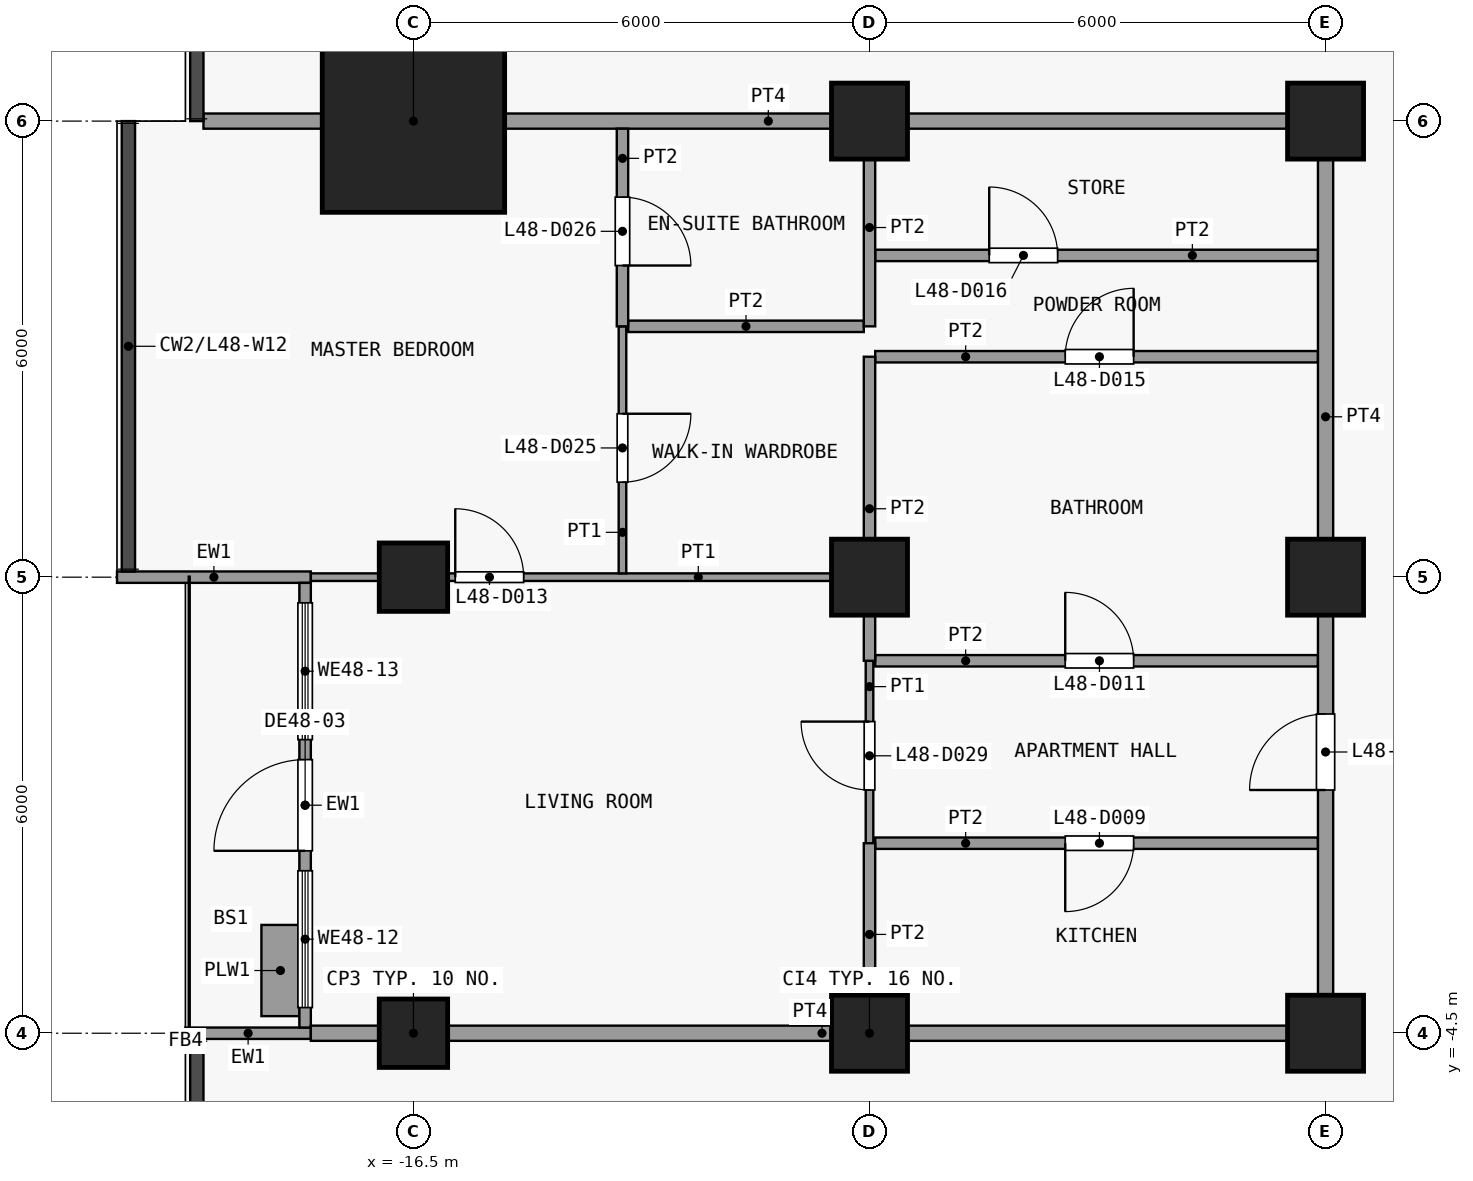
"""IFC4 building model, lengths in metres.
Left out: names, types, materials, properties, quantities, classifications, styles, units other than length and angle.
Written with IfcOpenShell. Run it as: python <this file> out.ifc"""

import sys

from ifc_helpers import new_model, si_unit, direction, frame, frame_2d, origin, origin_2d, place, context, subcontext, project, spatial, rectangle, extrude, element, fill, save


model = new_model("IFC4")
c1 = context("Model", 3, precision=1e-05, world=origin(), true_north=direction((0.0, 1.0)))
c2 = subcontext(c1, "Body", "Model", "MODEL_VIEW")
j1 = project(units=[si_unit("LENGTHUNIT", "METRE"), si_unit("PLANEANGLEUNIT", "RADIAN")], contexts=[c1])
p1 = place(None, origin())
s1 = spatial("IfcSite", under=j1, at=p1, CompositionType="ELEMENT")
p2 = place(p1, origin())
s2 = spatial("IfcBuilding", under=s1, at=p2, CompositionType="ELEMENT")
p3 = place(p2, frame((0.0, 0.0, 192.5)))
s3 = spatial("IfcBuildingStorey", under=s2, at=p3, CompositionType="ELEMENT", Elevation=192.5)
for number, where, z_axis, x_axis in (
    (1, (-16.5, -4.5, 0.0), (0.0, 0.0, 1.0), (1.0, 0.0, 0.0)),
    (2, (-16.5, 1.5, 0.0), (0.0, 0.0, 1.0), (1.0, 0.0, 0.0)),
):
    element("IfcColumn", number, at=place(p3, frame(where, z_axis=z_axis, x_axis=x_axis)), inside=s3, PredefinedType="COLUMN", context=c2, shape_type="SweptSolid", body=[
        extrude(rectangle(XDim=0.9, YDim=0.9, at=origin_2d()), origin(), (0.0, 0.0, 1.0), 3.6),
    ])
p4 = place(p3, frame((-16.5, 7.5, 0.0), z_axis=(0.0, 0.0, 1.0), x_axis=(1.0, 0.0, 0.0)))
e3 = element("IfcColumn", 3, at=p4, inside=s3, PredefinedType="COLUMN", context=c2, shape_type="SweptSolid", body=[
    extrude(rectangle(XDim=2.4, YDim=2.4, at=origin_2d()), origin(), (0.0, 0.0, 1.0), 3.6),
])
for number, where, z_axis, x_axis in (
    (4, (-10.5, -4.5, 0.0), (0.0, 0.0, 1.0), (1.0, 0.0, 0.0)),
    (5, (-10.5, 1.5, 0.0), (0.0, 0.0, 1.0), (1.0, 0.0, 0.0)),
    (6, (-10.5, 7.5, 0.0), (0.0, 0.0, 1.0), (1.0, 0.0, 0.0)),
    (7, (-4.5, -4.5, 0.0), (0.0, 0.0, 1.0), (1.0, 0.0, 0.0)),
    (8, (-4.5, 1.5, 0.0), (0.0, 0.0, 1.0), (1.0, 0.0, 0.0)),
    (9, (-4.5, 7.5, 0.0), (0.0, 0.0, 1.0), (1.0, 0.0, 0.0)),
):
    element("IfcColumn", number, at=place(p3, frame(where, z_axis=z_axis, x_axis=x_axis)), inside=s3, PredefinedType="COLUMN", context=c2, shape_type="SweptSolid", body=[
        extrude(rectangle(XDim=1.0, YDim=1.0, at=origin_2d()), origin(), (0.0, 0.0, 1.0), 3.6),
    ])
p5 = place(p3, frame((-17.85, -4.5, 0.0), z_axis=(0.0, 0.0, 1.0), x_axis=(-1.0, 0.0, 0.0)))
e10 = element("IfcWall", 10, at=p5, inside=s3, PredefinedType="SOLIDWALL", context=c2, shape_type="SweptSolid", body=[
    extrude(rectangle(XDim=1.65, YDim=0.15, at=frame_2d((0.825, 0.0))), origin(), (0.0, 0.0, 1.0), 3.3),
])
p6 = place(p3, frame((-17.85, 1.5, 0.0), z_axis=(0.0, 0.0, 1.0), x_axis=(-1.0, 0.0, 0.0)))
e11 = element("IfcWall", 11, at=p6, inside=s3, PredefinedType="SOLIDWALL", context=c2, shape_type="SweptSolid", body=[
    extrude(rectangle(XDim=2.55, YDim=0.15, at=frame_2d((1.275, 0.0))), origin(), (0.0, 0.0, 1.0), 3.3),
])
p7 = place(p3, frame((-17.925, -4.425, 0.0), z_axis=(0.0, 0.0, 1.0), x_axis=(0.0, 1.0, 0.0)))
e12 = element("IfcWall", 12, at=p7, inside=s3, PredefinedType="SOLIDWALL", context=c2, shape_type="SweptSolid", body=[
    extrude(rectangle(XDim=5.85, YDim=0.15, at=frame_2d((2.925, 0.0))), origin(), (0.0, 0.0, 1.0), 3.3),
])
p8 = place(p7, frame((2.325, 0.0, 0.0)))
e13 = element("IfcOpeningElement", 13, at=p8, cuts=e12, PredefinedType="OPENING", context=c2, shape_type="SweptSolid", body=[
    extrude(rectangle(XDim=1.2, YDim=2.4, at=frame_2d((0.6, 1.2))), frame((0.0, 0.085, 0.0), z_axis=(0.0, -1.0, 0.0), x_axis=(1.0, 0.0, 0.0)), (0.0, 0.0, 1.0), 0.17),
])
p9 = place(p7, frame((0.262, 0.0, 0.9)))
e14 = element("IfcOpeningElement", 14, at=p9, cuts=e12, PredefinedType="OPENING", context=c2, shape_type="SweptSolid", body=[
    extrude(rectangle(XDim=1.8, YDim=2.1, at=frame_2d((0.9, 1.05))), frame((0.0, 0.085, 0.0), z_axis=(0.0, -1.0, 0.0), x_axis=(1.0, 0.0, 0.0)), (0.0, 0.0, 1.0), 0.17),
])
p10 = place(p7, frame((3.788, 0.0, 0.9)))
e15 = element("IfcOpeningElement", 15, at=p10, cuts=e12, PredefinedType="OPENING", context=c2, shape_type="SweptSolid", body=[
    extrude(rectangle(XDim=1.8, YDim=2.1, at=frame_2d((0.9, 1.05))), frame((0.0, 0.085, 0.0), z_axis=(0.0, -1.0, 0.0), x_axis=(1.0, 0.0, 0.0)), (0.0, 0.0, 1.0), 0.17),
])
p11 = place(p3, frame((-18.25, -4.275, 0.0), z_axis=(0.0, 0.0, 1.0), x_axis=(0.0, 1.0, 0.0)))
e16 = element("IfcWall", 16, at=p11, inside=s3, PredefinedType="USERDEFINED", context=c2, shape_type="SweptSolid", body=[
    extrude(rectangle(XDim=1.2, YDim=0.5, at=frame_2d((0.6, 0.0))), origin(), (0.0, 0.0, 1.0), 0.9),
])
p12 = place(p3, frame((-17.85, -4.5, 0.0), z_axis=(0.0, 0.0, 1.0), x_axis=(1.0, 0.0, 0.0)))
e17 = element("IfcWall", 17, at=p12, inside=s3, PredefinedType="PARTITIONING", context=c2, shape_type="SweptSolid", body=[
    extrude(rectangle(XDim=13.45, YDim=0.2, at=frame_2d((6.725, 0.0))), origin(), (0.0, 0.0, 1.0), 3.3),
])
p13 = place(p3, frame((-10.425, -2.0, 0.0), z_axis=(0.0, 0.0, 1.0), x_axis=(1.0, 0.0, 0.0)))
e18 = element("IfcWall", 18, at=p13, inside=s3, PredefinedType="PARTITIONING", context=c2, shape_type="SweptSolid", body=[
    extrude(rectangle(XDim=5.825, YDim=0.15, at=frame_2d((2.913, 0.0))), origin(), (0.0, 0.0, 1.0), 3.3),
])
p14 = place(p13, frame((2.5, 0.0, 0.0)))
e19 = element("IfcOpeningElement", 19, at=p14, cuts=e18, PredefinedType="OPENING", context=c2, shape_type="SweptSolid", body=[
    extrude(rectangle(XDim=0.9, YDim=2.1, at=frame_2d((0.45, 1.05))), frame((0.0, 0.085, 0.0), z_axis=(0.0, -1.0, 0.0), x_axis=(1.0, 0.0, 0.0)), (0.0, 0.0, 1.0), 0.17),
])
p15 = place(p3, frame((-10.425, 0.4, 0.0), z_axis=(0.0, 0.0, 1.0), x_axis=(1.0, 0.0, 0.0)))
e20 = element("IfcWall", 20, at=p15, inside=s3, PredefinedType="PARTITIONING", context=c2, shape_type="SweptSolid", body=[
    extrude(rectangle(XDim=5.825, YDim=0.15, at=frame_2d((2.913, 0.0))), origin(), (0.0, 0.0, 1.0), 3.3),
])
p16 = place(p15, frame((2.5, 0.0, 0.0)))
e21 = element("IfcOpeningElement", 21, at=p16, cuts=e20, PredefinedType="OPENING", context=c2, shape_type="SweptSolid", body=[
    extrude(rectangle(XDim=0.9, YDim=2.1, at=frame_2d((0.45, 1.05))), frame((0.0, 0.085, 0.0), z_axis=(0.0, -1.0, 0.0), x_axis=(1.0, 0.0, 0.0)), (0.0, 0.0, 1.0), 0.17),
])
p17 = place(p3, frame((-17.85, 1.5, 0.0), z_axis=(0.0, 0.0, 1.0), x_axis=(1.0, 0.0, 0.0)))
e22 = element("IfcWall", 22, at=p17, inside=s3, PredefinedType="PARTITIONING", context=c2, shape_type="SweptSolid", body=[
    extrude(rectangle(XDim=7.275, YDim=0.1, at=frame_2d((3.638, 0.0))), origin(), (0.0, 0.0, 1.0), 3.3),
])
p18 = place(p17, frame((1.9, 0.0, 0.0)))
e23 = element("IfcOpeningElement", 23, at=p18, cuts=e22, PredefinedType="OPENING", context=c2, shape_type="SweptSolid", body=[
    extrude(rectangle(XDim=0.9, YDim=2.1, at=frame_2d((0.45, 1.05))), frame((0.0, 0.06, 0.0), z_axis=(0.0, -1.0, 0.0), x_axis=(1.0, 0.0, 0.0)), (0.0, 0.0, 1.0), 0.12),
])
p19 = place(p3, frame((-10.425, 4.4, 0.0), z_axis=(0.0, 0.0, 1.0), x_axis=(1.0, 0.0, 0.0)))
e24 = element("IfcWall", 24, at=p19, inside=s3, PredefinedType="PARTITIONING", context=c2, shape_type="SweptSolid", body=[
    extrude(rectangle(XDim=5.825, YDim=0.15, at=frame_2d((2.913, 0.0))), origin(), (0.0, 0.0, 1.0), 3.3),
])
p20 = place(p19, frame((2.5, 0.0, 0.0)))
e25 = element("IfcOpeningElement", 25, at=p20, cuts=e24, PredefinedType="OPENING", context=c2, shape_type="SweptSolid", body=[
    extrude(rectangle(XDim=0.9, YDim=2.1, at=frame_2d((0.45, 1.05))), frame((0.0, 0.085, 0.0), z_axis=(0.0, -1.0, 0.0), x_axis=(1.0, 0.0, 0.0)), (0.0, 0.0, 1.0), 0.17),
])
p21 = place(p3, frame((-13.675, 4.8, 0.0), z_axis=(0.0, 0.0, 1.0), x_axis=(1.0, 0.0, 0.0)))
e26 = element("IfcWall", 26, at=p21, inside=s3, PredefinedType="PARTITIONING", context=c2, shape_type="SweptSolid", body=[
    extrude(rectangle(XDim=3.1, YDim=0.15, at=frame_2d((1.55, 0.0))), origin(), (0.0, 0.0, 1.0), 3.3),
])
p22 = place(p3, frame((-10.425, 5.733, 0.0), z_axis=(0.0, 0.0, 1.0), x_axis=(1.0, 0.0, 0.0)))
e27 = element("IfcWall", 27, at=p22, inside=s3, PredefinedType="PARTITIONING", context=c2, shape_type="SweptSolid", body=[
    extrude(rectangle(XDim=5.825, YDim=0.15, at=frame_2d((2.913, 0.0))), origin(), (0.0, 0.0, 1.0), 3.3),
])
p23 = place(p22, frame((1.5, 0.0, 0.0)))
e28 = element("IfcOpeningElement", 28, at=p23, cuts=e27, PredefinedType="OPENING", context=c2, shape_type="SweptSolid", body=[
    extrude(rectangle(XDim=0.9, YDim=2.1, at=frame_2d((0.45, 1.05))), frame((0.0, 0.085, 0.0), z_axis=(0.0, -1.0, 0.0), x_axis=(1.0, 0.0, 0.0)), (0.0, 0.0, 1.0), 0.17),
])
p24 = place(p3, frame((-19.262, 7.5, 0.0), z_axis=(0.0, 0.0, 1.0), x_axis=(1.0, 0.0, 0.0)))
e29 = element("IfcWall", 29, at=p24, inside=s3, PredefinedType="PARTITIONING", context=c2, shape_type="SweptSolid", body=[
    extrude(rectangle(XDim=14.863, YDim=0.2, at=frame_2d((7.431, 0.0))), origin(), (0.0, 0.0, 1.0), 3.3),
])
p25 = place(p3, frame((-13.75, 1.55, 0.0), z_axis=(0.0, 0.0, 1.0), x_axis=(0.0, 1.0, 0.0)))
e30 = element("IfcWall", 30, at=p25, inside=s3, PredefinedType="PARTITIONING", context=c2, shape_type="SweptSolid", body=[
    extrude(rectangle(XDim=3.25, YDim=0.1, at=frame_2d((1.625, 0.0))), origin(), (0.0, 0.0, 1.0), 3.3),
])
p26 = place(p25, frame((1.2, 0.0, 0.0)))
e31 = element("IfcOpeningElement", 31, at=p26, cuts=e30, PredefinedType="OPENING", context=c2, shape_type="SweptSolid", body=[
    extrude(rectangle(XDim=0.9, YDim=2.1, at=frame_2d((0.45, 1.05))), frame((0.0, 0.06, 0.0), z_axis=(0.0, -1.0, 0.0), x_axis=(1.0, 0.0, 0.0)), (0.0, 0.0, 1.0), 0.12),
])
p27 = place(p3, frame((-13.75, 4.8, 0.0), z_axis=(0.0, 0.0, 1.0), x_axis=(0.0, 1.0, 0.0)))
e32 = element("IfcWall", 32, at=p27, inside=s3, PredefinedType="PARTITIONING", context=c2, shape_type="SweptSolid", body=[
    extrude(rectangle(XDim=2.6, YDim=0.15, at=frame_2d((1.3, 0.0))), origin(), (0.0, 0.0, 1.0), 3.3),
])
p28 = place(p27, frame((0.8, 0.0, 0.0)))
e33 = element("IfcOpeningElement", 33, at=p28, cuts=e32, PredefinedType="OPENING", context=c2, shape_type="SweptSolid", body=[
    extrude(rectangle(XDim=0.9, YDim=2.1, at=frame_2d((0.45, 1.05))), frame((0.0, 0.085, 0.0), z_axis=(0.0, -1.0, 0.0), x_axis=(1.0, 0.0, 0.0)), (0.0, 0.0, 1.0), 0.17),
])
p29 = place(p3, frame((-10.5, -2.0, 0.0), z_axis=(0.0, 0.0, 1.0), x_axis=(0.0, 1.0, 0.0)))
e34 = element("IfcWall", 34, at=p29, inside=s3, PredefinedType="PARTITIONING", context=c2, shape_type="SweptSolid", body=[
    extrude(rectangle(XDim=2.4, YDim=0.1, at=frame_2d((1.2, 0.0))), origin(), (0.0, 0.0, 1.0), 3.3),
])
p30 = place(p29, frame((0.7, 0.0, 0.0)))
e35 = element("IfcOpeningElement", 35, at=p30, cuts=e34, PredefinedType="OPENING", context=c2, shape_type="SweptSolid", body=[
    extrude(rectangle(XDim=0.9, YDim=2.1, at=frame_2d((0.45, 1.05))), frame((0.0, 0.06, 0.0), z_axis=(0.0, -1.0, 0.0), x_axis=(1.0, 0.0, 0.0)), (0.0, 0.0, 1.0), 0.12),
])
p31 = place(p3, frame((-10.5, -4.4, 0.0), z_axis=(0.0, 0.0, 1.0), x_axis=(0.0, 1.0, 0.0)))
e36 = element("IfcWall", 36, at=p31, inside=s3, PredefinedType="PARTITIONING", context=c2, shape_type="SweptSolid", body=[
    extrude(rectangle(XDim=2.4, YDim=0.15, at=frame_2d((1.2, 0.0))), origin(), (0.0, 0.0, 1.0), 3.3),
])
p32 = place(p3, frame((-10.5, 0.4, 0.0), z_axis=(0.0, 0.0, 1.0), x_axis=(0.0, 1.0, 0.0)))
e37 = element("IfcWall", 37, at=p32, inside=s3, PredefinedType="PARTITIONING", context=c2, shape_type="SweptSolid", body=[
    extrude(rectangle(XDim=4.0, YDim=0.15, at=frame_2d((2.0, 0.0))), origin(), (0.0, 0.0, 1.0), 3.3),
])
p33 = place(p3, frame((-10.5, 4.8, 0.0), z_axis=(0.0, 0.0, 1.0), x_axis=(0.0, 1.0, 0.0)))
e38 = element("IfcWall", 38, at=p33, inside=s3, PredefinedType="PARTITIONING", context=c2, shape_type="SweptSolid", body=[
    extrude(rectangle(XDim=2.6, YDim=0.15, at=frame_2d((1.3, 0.0))), origin(), (0.0, 0.0, 1.0), 3.3),
])
p34 = place(p3, frame((-4.5, -4.4, 0.0), z_axis=(0.0, 0.0, 1.0), x_axis=(0.0, 1.0, 0.0)))
e39 = element("IfcWall", 39, at=p34, inside=s3, PredefinedType="PARTITIONING", context=c2, shape_type="SweptSolid", body=[
    extrude(rectangle(XDim=11.8, YDim=0.2, at=frame_2d((5.9, 0.0))), origin(), (0.0, 0.0, 1.0), 3.3),
])
p35 = place(p34, frame((3.1, 0.0, 0.0)))
e40 = element("IfcOpeningElement", 40, at=p35, cuts=e39, PredefinedType="OPENING", context=c2, shape_type="SweptSolid", body=[
    extrude(rectangle(XDim=1.0, YDim=2.1, at=frame_2d((0.5, 1.05))), frame((0.0, 0.11, 0.0), z_axis=(0.0, -1.0, 0.0), x_axis=(1.0, 0.0, 0.0)), (0.0, 0.0, 1.0), 0.22),
])
p36 = place(p8, origin())
e41 = element("IfcDoor", 41, at=p36, inside=s3, OperationType="SINGLE_SWING_LEFT", PredefinedType="DOOR", context=c2, shape_type="SweptSolid", body=[
    extrude(rectangle(XDim=1.2, YDim=2.4, at=frame_2d((0.6, 1.2))), frame((0.0, 0.025, 0.0), z_axis=(0.0, -1.0, 0.0), x_axis=(1.0, 0.0, 0.0)), (0.0, 0.0, 1.0), 0.05),
])
fill(e13, e41)
p37 = place(p9, origin())
e42 = element("IfcWindow", 42, at=p37, inside=s3, PartitioningType="SINGLE_PANEL", PredefinedType="WINDOW", context=c2, shape_type="SweptSolid", body=[
    extrude(rectangle(XDim=1.8, YDim=2.1, at=frame_2d((0.9, 1.05))), frame((0.0, 0.03, 0.0), z_axis=(0.0, -1.0, 0.0), x_axis=(1.0, 0.0, 0.0)), (0.0, 0.0, 1.0), 0.06),
])
fill(e14, e42)
p38 = place(p10, origin())
e43 = element("IfcWindow", 43, at=p38, inside=s3, PartitioningType="SINGLE_PANEL", PredefinedType="WINDOW", context=c2, shape_type="SweptSolid", body=[
    extrude(rectangle(XDim=1.8, YDim=2.1, at=frame_2d((0.9, 1.05))), frame((0.0, 0.03, 0.0), z_axis=(0.0, -1.0, 0.0), x_axis=(1.0, 0.0, 0.0)), (0.0, 0.0, 1.0), 0.06),
])
fill(e15, e43)
p39 = place(p14, origin())
e44 = element("IfcDoor", 44, at=p39, inside=s3, OperationType="SINGLE_SWING_LEFT", PredefinedType="DOOR", context=c2, shape_type="SweptSolid", body=[
    extrude(rectangle(XDim=0.9, YDim=2.1, at=frame_2d((0.45, 1.05))), frame((0.0, 0.025, 0.0), z_axis=(0.0, -1.0, 0.0), x_axis=(1.0, 0.0, 0.0)), (0.0, 0.0, 1.0), 0.05),
])
fill(e19, e44)
p40 = place(p16, origin())
e45 = element("IfcDoor", 45, at=p40, inside=s3, OperationType="SINGLE_SWING_RIGHT", PredefinedType="DOOR", context=c2, shape_type="SweptSolid", body=[
    extrude(rectangle(XDim=0.9, YDim=2.1, at=frame_2d((0.45, 1.05))), frame((0.0, 0.025, 0.0), z_axis=(0.0, -1.0, 0.0), x_axis=(1.0, 0.0, 0.0)), (0.0, 0.0, 1.0), 0.05),
])
fill(e21, e45)
p41 = place(p18, origin())
e46 = element("IfcDoor", 46, at=p41, inside=s3, OperationType="SINGLE_SWING_RIGHT", PredefinedType="DOOR", context=c2, shape_type="SweptSolid", body=[
    extrude(rectangle(XDim=0.9, YDim=2.1, at=frame_2d((0.45, 1.05))), frame((0.0, 0.025, 0.0), z_axis=(0.0, -1.0, 0.0), x_axis=(1.0, 0.0, 0.0)), (0.0, 0.0, 1.0), 0.05),
])
fill(e23, e46)
p42 = place(p20, origin())
e47 = element("IfcDoor", 47, at=p42, inside=s3, OperationType="SINGLE_SWING_LEFT", PredefinedType="DOOR", context=c2, shape_type="SweptSolid", body=[
    extrude(rectangle(XDim=0.9, YDim=2.1, at=frame_2d((0.45, 1.05))), frame((0.0, 0.025, 0.0), z_axis=(0.0, -1.0, 0.0), x_axis=(1.0, 0.0, 0.0)), (0.0, 0.0, 1.0), 0.05),
])
fill(e25, e47)
p43 = place(p23, origin())
e48 = element("IfcDoor", 48, at=p43, inside=s3, OperationType="SINGLE_SWING_RIGHT", PredefinedType="DOOR", context=c2, shape_type="SweptSolid", body=[
    extrude(rectangle(XDim=0.9, YDim=2.1, at=frame_2d((0.45, 1.05))), frame((0.0, 0.025, 0.0), z_axis=(0.0, -1.0, 0.0), x_axis=(1.0, 0.0, 0.0)), (0.0, 0.0, 1.0), 0.05),
])
fill(e28, e48)
p44 = place(p26, origin())
e49 = element("IfcDoor", 49, at=p44, inside=s3, OperationType="SINGLE_SWING_RIGHT", PredefinedType="DOOR", context=c2, shape_type="SweptSolid", body=[
    extrude(rectangle(XDim=0.9, YDim=2.1, at=frame_2d((0.45, 1.05))), frame((0.0, 0.025, 0.0), z_axis=(0.0, -1.0, 0.0), x_axis=(1.0, 0.0, 0.0)), (0.0, 0.0, 1.0), 0.05),
])
fill(e31, e49)
p45 = place(p28, origin())
e50 = element("IfcDoor", 50, at=p45, inside=s3, OperationType="SINGLE_SWING_LEFT", PredefinedType="DOOR", context=c2, shape_type="SweptSolid", body=[
    extrude(rectangle(XDim=0.9, YDim=2.1, at=frame_2d((0.45, 1.05))), frame((0.0, 0.025, 0.0), z_axis=(0.0, -1.0, 0.0), x_axis=(1.0, 0.0, 0.0)), (0.0, 0.0, 1.0), 0.05),
])
fill(e33, e50)
p46 = place(p30, origin())
e51 = element("IfcDoor", 51, at=p46, inside=s3, OperationType="SINGLE_SWING_LEFT", PredefinedType="DOOR", context=c2, shape_type="SweptSolid", body=[
    extrude(rectangle(XDim=0.9, YDim=2.1, at=frame_2d((0.45, 1.05))), frame((0.0, 0.025, 0.0), z_axis=(0.0, -1.0, 0.0), x_axis=(1.0, 0.0, 0.0)), (0.0, 0.0, 1.0), 0.05),
])
fill(e35, e51)
p47 = place(p35, origin())
e52 = element("IfcDoor", 52, at=p47, inside=s3, OperationType="SINGLE_SWING_RIGHT", PredefinedType="DOOR", context=c2, shape_type="SweptSolid", body=[
    extrude(rectangle(XDim=1.0, YDim=2.1, at=frame_2d((0.5, 1.05))), frame((0.0, 0.025, 0.0), z_axis=(0.0, -1.0, 0.0), x_axis=(1.0, 0.0, 0.0)), (0.0, 0.0, 1.0), 0.05),
])
fill(e40, e52)
save(model, sys.argv[1])
